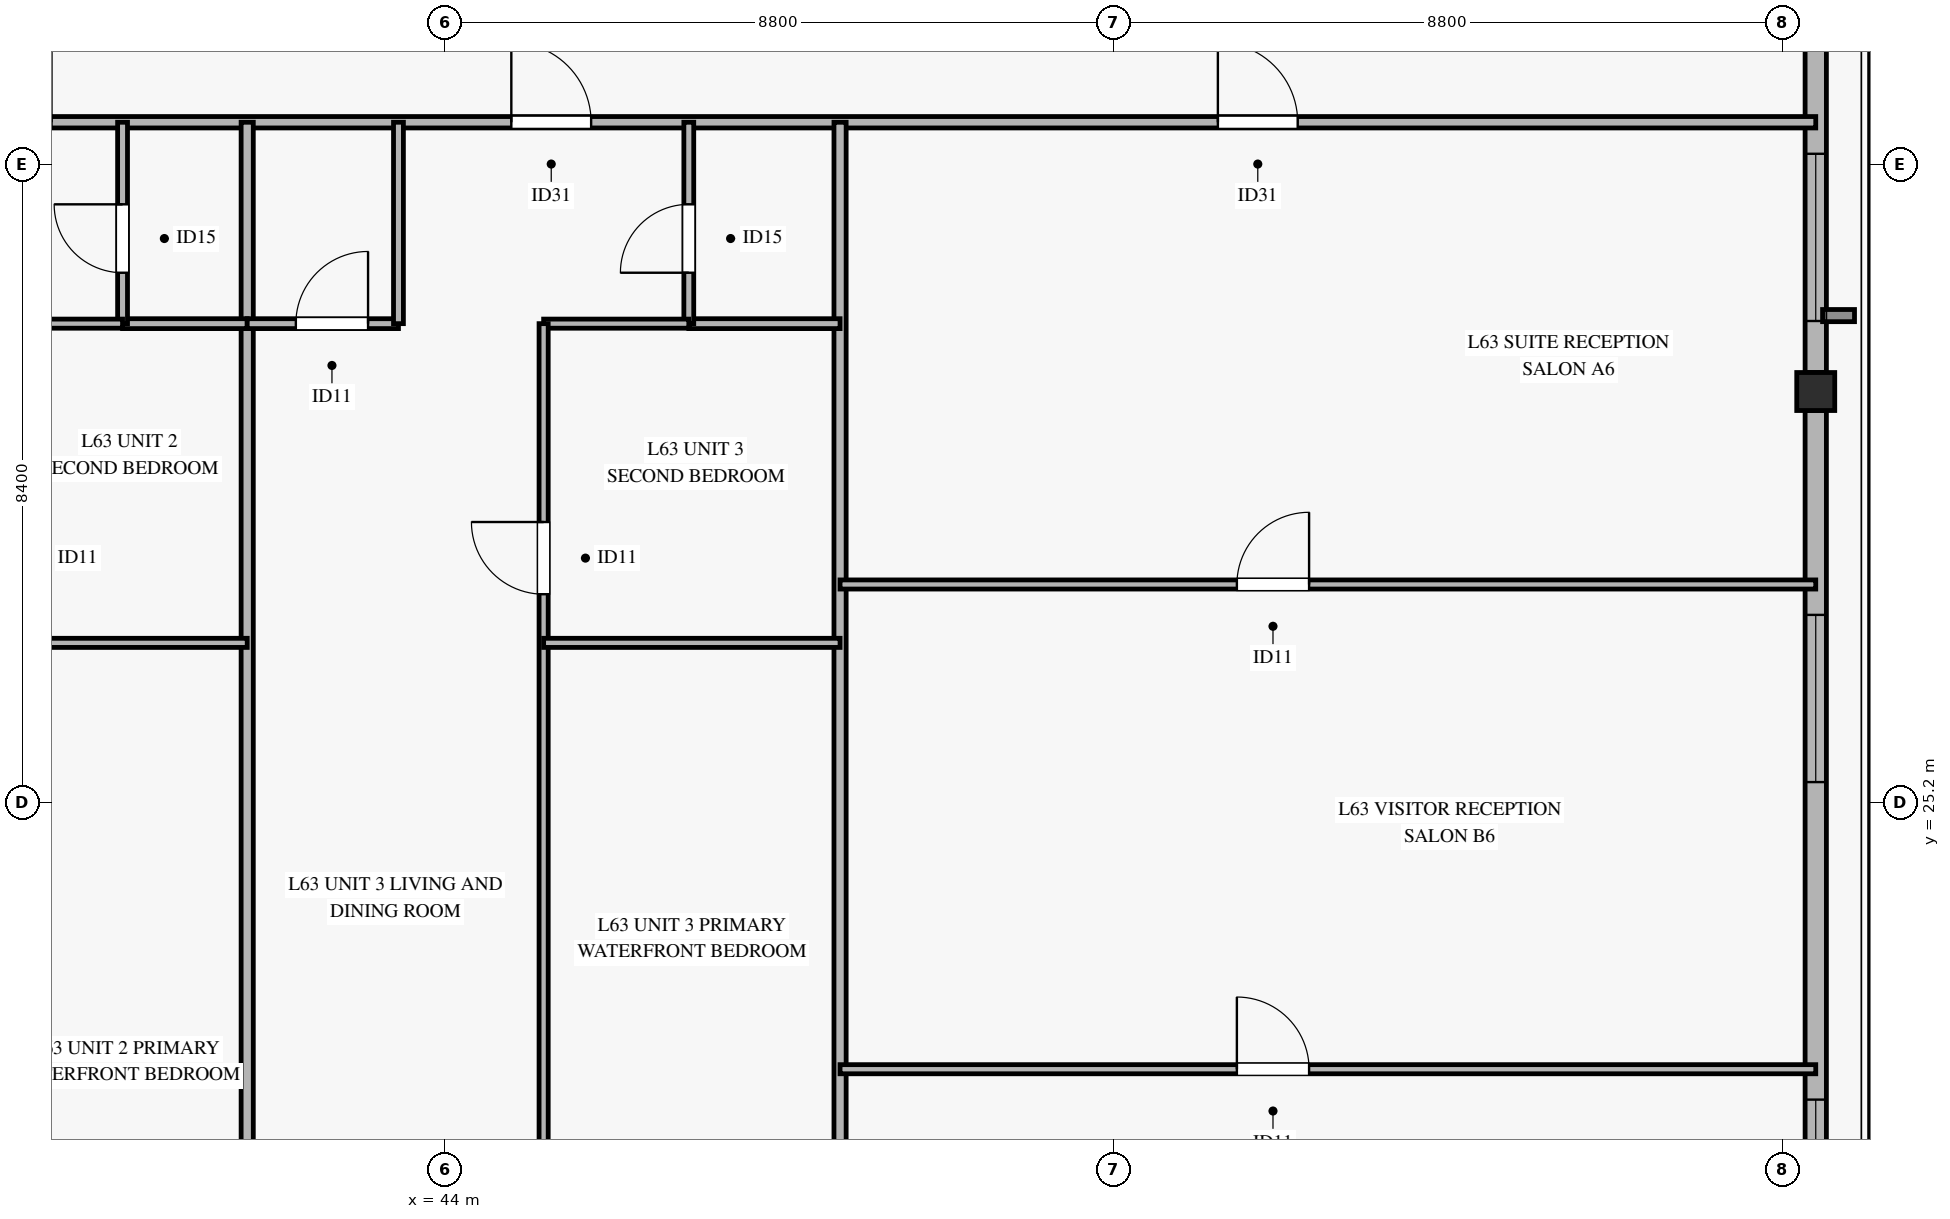
"""IFC4 building model, lengths in metres.
Left out: names, types, materials, properties, quantities, classifications, styles, units other than length and angle.
Written with IfcOpenShell. Run it as: python <this file> out.ifc"""

import sys

from ifc_helpers import new_model, si_unit, direction, frame, frame_2d, origin, origin_2d, place, context, subcontext, project, spatial, rectangle, hollow_rectangle, extrude, source, transform, mapped, element, fill, save


model = new_model("IFC4")
c1 = context("Model", 3, precision=1e-05, world=origin(), true_north=direction((0.0, 1.0)))
c2 = subcontext(c1, "Body", "Model", "MODEL_VIEW")
j1 = project(units=[si_unit("LENGTHUNIT", "METRE"), si_unit("PLANEANGLEUNIT", "RADIAN")], contexts=[c1])
p1 = place(None, origin())
s1 = spatial("IfcSite", under=j1, at=p1, CompositionType="ELEMENT")
p2 = place(p1, origin())
s2 = spatial("IfcBuilding", under=s1, at=p2, CompositionType="ELEMENT")
p3 = place(p2, frame((0.0, 0.0, 248.5)))
s3 = spatial("IfcBuildingStorey", under=s2, at=p3, CompositionType="ELEMENT", Elevation=248.5)
m1 = source(origin(), c2, "Body", "SweptSolid", [
    extrude(hollow_rectangle(XDim=0.5, YDim=0.5, WallThickness=0.024, at=origin_2d()), origin(), (0.0, 0.0, 1.0), 3.185),
])
p4 = place(p3, frame((62.037, 30.607, 0.0), z_axis=(0.0, 0.0, 1.0), x_axis=(1.0, 0.0, 0.0)))
e1 = element("IfcColumn", 1, at=p4, inside=s3, PredefinedType="COLUMN", context=c2, shape_type="MappedRepresentation", body=[
    mapped(m1, transform((0.0, 0.0, 0.0), x_axis=(1.0, 0.0, 0.0), y_axis=(0.0, 1.0, 0.0), z_axis=(0.0, 0.0, 1.0), scale=1.0)),
])
p5 = place(p3, frame((62.037, 17.728, 0.0), z_axis=(0.0, 0.0, 1.0), x_axis=(0.0, 1.0, 0.0)))
e2 = element("IfcWall", 2, at=p5, inside=s3, PredefinedType="SOLIDWALL", context=c2, shape_type="SweptSolid", body=[
    extrude(rectangle(XDim=12.629, YDim=0.28, at=frame_2d((6.314, 0.0))), origin(), (0.0, 0.0, 1.0), 2.815),
])
p6 = place(p5, frame((1.362, 0.0, 0.45)))
e3 = element("IfcOpeningElement", 3, at=p6, cuts=e2, PredefinedType="OPENING", context=c2, shape_type="SweptSolid", body=[
    extrude(rectangle(XDim=2.2, YDim=2.1, at=frame_2d((1.1, 1.05))), frame((0.0, 0.15, 0.0), z_axis=(0.0, -1.0, 0.0), x_axis=(1.0, 0.0, 0.0)), (0.0, 0.0, 1.0), 0.3),
])
p7 = place(p5, frame((7.74, 0.0, 0.45)))
e4 = element("IfcOpeningElement", 4, at=p7, cuts=e2, PredefinedType="OPENING", context=c2, shape_type="SweptSolid", body=[
    extrude(rectangle(XDim=2.2, YDim=2.1, at=frame_2d((1.1, 1.05))), frame((0.0, 0.15, 0.0), z_axis=(0.0, -1.0, 0.0), x_axis=(1.0, 0.0, 0.0)), (0.0, 0.0, 1.0), 0.3),
])
p8 = place(p3, frame((62.037, 30.857, 0.0), z_axis=(0.0, 0.0, 1.0), x_axis=(0.0, 1.0, 0.0)))
e5 = element("IfcWall", 5, at=p8, inside=s3, PredefinedType="SOLIDWALL", context=c2, shape_type="SweptSolid", body=[
    extrude(rectangle(XDim=12.628, YDim=0.28, at=frame_2d((6.314, 0.0))), origin(), (0.0, 0.0, 1.0), 2.815),
])
p9 = place(p8, frame((0.678, 0.0, 0.45)))
e6 = element("IfcOpeningElement", 6, at=p9, cuts=e5, PredefinedType="OPENING", context=c2, shape_type="SweptSolid", body=[
    extrude(rectangle(XDim=2.2, YDim=2.1, at=frame_2d((1.1, 1.05))), frame((0.0, 0.15, 0.0), z_axis=(0.0, -1.0, 0.0), x_axis=(1.0, 0.0, 0.0)), (0.0, 0.0, 1.0), 0.3),
])
p10 = place(p3, frame((8.364, 34.15, 0.0), z_axis=(0.0, 0.0, 1.0), x_axis=(1.0, 0.0, 0.0)))
e7 = element("IfcWall", 7, at=p10, inside=s3, PredefinedType="PARTITIONING", context=c2, shape_type="SweptSolid", body=[
    extrude(rectangle(XDim=53.673, YDim=0.15, at=frame_2d((26.836, 0.0))), origin(), (0.0, 0.0, 1.0), 2.47),
])
p11 = place(p10, frame((5.627, 0.0, 0.0)))
e8 = element("IfcOpeningElement", 8, at=p11, cuts=e7, PredefinedType="OPENING", context=c2, shape_type="SweptSolid", body=[
    extrude(rectangle(XDim=1.05, YDim=2.15, at=frame_2d((0.525, 1.075))), frame((0.0, 0.085, 0.0), z_axis=(0.0, -1.0, 0.0), x_axis=(1.0, 0.0, 0.0)), (0.0, 0.0, 1.0), 0.17),
])
p12 = place(p10, frame((16.561, 0.0, 0.0)))
e9 = element("IfcOpeningElement", 9, at=p12, cuts=e7, PredefinedType="OPENING", context=c2, shape_type="SweptSolid", body=[
    extrude(rectangle(XDim=1.05, YDim=2.15, at=frame_2d((0.525, 1.075))), frame((0.0, 0.085, 0.0), z_axis=(0.0, -1.0, 0.0), x_axis=(1.0, 0.0, 0.0)), (0.0, 0.0, 1.0), 0.17),
])
p13 = place(p10, frame((23.011, 0.0, 0.0)))
e10 = element("IfcOpeningElement", 10, at=p13, cuts=e7, PredefinedType="OPENING", context=c2, shape_type="SweptSolid", body=[
    extrude(rectangle(XDim=1.05, YDim=2.15, at=frame_2d((0.525, 1.075))), frame((0.0, 0.085, 0.0), z_axis=(0.0, -1.0, 0.0), x_axis=(1.0, 0.0, 0.0)), (0.0, 0.0, 1.0), 0.17),
])
p14 = place(p10, frame((29.411, 0.0, 0.0)))
e11 = element("IfcOpeningElement", 11, at=p14, cuts=e7, PredefinedType="OPENING", context=c2, shape_type="SweptSolid", body=[
    extrude(rectangle(XDim=1.05, YDim=2.15, at=frame_2d((0.525, 1.075))), frame((0.0, 0.085, 0.0), z_axis=(0.0, -1.0, 0.0), x_axis=(1.0, 0.0, 0.0)), (0.0, 0.0, 1.0), 0.17),
])
p15 = place(p10, frame((36.511, 0.0, 0.0)))
e12 = element("IfcOpeningElement", 12, at=p15, cuts=e7, PredefinedType="OPENING", context=c2, shape_type="SweptSolid", body=[
    extrude(rectangle(XDim=1.05, YDim=2.15, at=frame_2d((0.525, 1.075))), frame((0.0, 0.085, 0.0), z_axis=(0.0, -1.0, 0.0), x_axis=(1.0, 0.0, 0.0)), (0.0, 0.0, 1.0), 0.17),
])
p16 = place(p10, frame((45.807, 0.0, 0.0)))
e13 = element("IfcOpeningElement", 13, at=p16, cuts=e7, PredefinedType="OPENING", context=c2, shape_type="SweptSolid", body=[
    extrude(rectangle(XDim=1.05, YDim=2.15, at=frame_2d((0.525, 1.075))), frame((0.0, 0.085, 0.0), z_axis=(0.0, -1.0, 0.0), x_axis=(1.0, 0.0, 0.0)), (0.0, 0.0, 1.0), 0.17),
])
for number, where, z_axis, x_axis in (
    (14, (41.4, 15.113, 0.0), (0.0, 0.0, 1.0), (0.0, 1.0, 0.0)),
    (15, (49.2, 15.113, 0.0), (0.0, 0.0, 1.0), (0.0, 1.0, 0.0)),
):
    element("IfcWall", number, at=place(p3, frame(where, z_axis=z_axis, x_axis=x_axis)), inside=s3, PredefinedType="PARTITIONING", context=c2, shape_type="SweptSolid", body=[
        extrude(rectangle(XDim=19.037, YDim=0.16, at=frame_2d((9.519, 0.0))), origin(), (0.0, 0.0, 1.0), 2.77),
    ])
p17 = place(p3, frame((39.76, 31.5, 0.0), z_axis=(0.0, 0.0, 1.0), x_axis=(1.0, 0.0, 0.0)))
e16 = element("IfcWall", 16, at=p17, inside=s3, PredefinedType="PARTITIONING", context=c2, shape_type="SweptSolid", body=[
    extrude(rectangle(XDim=1.64, YDim=0.13, at=frame_2d((0.82, 0.0))), origin(), (0.0, 0.0, 1.0), 3.185),
])
p18 = place(p3, frame((39.76, 31.5, 0.0), z_axis=(0.0, 0.0, 1.0), x_axis=(0.0, 1.0, 0.0)))
e17 = element("IfcWall", 17, at=p18, inside=s3, PredefinedType="PARTITIONING", context=c2, shape_type="SweptSolid", body=[
    extrude(rectangle(XDim=2.65, YDim=0.13, at=frame_2d((1.325, 0.0))), origin(), (0.0, 0.0, 1.0), 2.77),
])
p19 = place(p18, frame((0.67, 0.0, 0.0)))
e18 = element("IfcOpeningElement", 18, at=p19, cuts=e17, PredefinedType="OPENING", context=c2, shape_type="SweptSolid", body=[
    extrude(rectangle(XDim=0.9, YDim=2.1, at=frame_2d((0.45, 1.05))), frame((0.0, 0.075, 0.0), z_axis=(0.0, -1.0, 0.0), x_axis=(1.0, 0.0, 0.0)), (0.0, 0.0, 1.0), 0.15),
])
p20 = place(p3, frame((38.2, 31.5, 0.0), z_axis=(0.0, 0.0, 1.0), x_axis=(1.0, 0.0, 0.0)))
e19 = element("IfcWall", 19, at=p20, inside=s3, PredefinedType="PARTITIONING", context=c2, shape_type="SweptSolid", body=[
    extrude(rectangle(XDim=1.56, YDim=0.12, at=frame_2d((0.78, 0.0))), origin(), (0.0, 0.0, 1.0), 3.185),
])
p21 = place(p3, frame((38.2, 27.3, 0.0), z_axis=(0.0, 0.0, 1.0), x_axis=(1.0, 0.0, 0.0)))
e20 = element("IfcWall", 20, at=p21, inside=s3, PredefinedType="PARTITIONING", context=c2, shape_type="SweptSolid", body=[
    extrude(rectangle(XDim=3.2, YDim=0.12, at=frame_2d((1.6, 0.0))), origin(), (0.0, 0.0, 1.0), 3.185),
])
p22 = place(p3, frame((41.4, 31.5, 0.0), z_axis=(0.0, 0.0, 1.0), x_axis=(1.0, 0.0, 0.0)))
e21 = element("IfcWall", 21, at=p22, inside=s3, PredefinedType="PARTITIONING", context=c2, shape_type="SweptSolid", body=[
    extrude(rectangle(XDim=1.99, YDim=0.13, at=frame_2d((0.995, 0.0))), origin(), (0.0, 0.0, 1.0), 3.185),
])
p23 = place(p22, frame((0.64, 0.0, 0.0)))
e22 = element("IfcOpeningElement", 22, at=p23, cuts=e21, PredefinedType="OPENING", context=c2, shape_type="SweptSolid", body=[
    extrude(rectangle(XDim=0.95, YDim=2.1, at=frame_2d((0.475, 1.05))), frame((0.0, 0.075, 0.0), z_axis=(0.0, -1.0, 0.0), x_axis=(1.0, 0.0, 0.0)), (0.0, 0.0, 1.0), 0.15),
])
p24 = place(p3, frame((43.39, 31.5, 0.0), z_axis=(0.0, 0.0, 1.0), x_axis=(0.0, 1.0, 0.0)))
e23 = element("IfcWall", 23, at=p24, inside=s3, PredefinedType="PARTITIONING", context=c2, shape_type="SweptSolid", body=[
    extrude(rectangle(XDim=2.65, YDim=0.13, at=frame_2d((1.325, 0.0))), origin(), (0.0, 0.0, 1.0), 2.77),
])
p25 = place(p3, frame((47.21, 31.5, 0.0), z_axis=(0.0, 0.0, 1.0), x_axis=(1.0, 0.0, 0.0)))
e24 = element("IfcWall", 24, at=p25, inside=s3, PredefinedType="PARTITIONING", context=c2, shape_type="SweptSolid", body=[
    extrude(rectangle(XDim=1.99, YDim=0.13, at=frame_2d((0.995, 0.0))), origin(), (0.0, 0.0, 1.0), 3.185),
])
p26 = place(p3, frame((47.21, 31.5, 0.0), z_axis=(0.0, 0.0, 1.0), x_axis=(0.0, 1.0, 0.0)))
e25 = element("IfcWall", 25, at=p26, inside=s3, PredefinedType="PARTITIONING", context=c2, shape_type="SweptSolid", body=[
    extrude(rectangle(XDim=2.65, YDim=0.13, at=frame_2d((1.325, 0.0))), origin(), (0.0, 0.0, 1.0), 2.77),
])
p27 = place(p26, frame((0.67, 0.0, 0.0)))
e26 = element("IfcOpeningElement", 26, at=p27, cuts=e25, PredefinedType="OPENING", context=c2, shape_type="SweptSolid", body=[
    extrude(rectangle(XDim=0.9, YDim=2.1, at=frame_2d((0.45, 1.05))), frame((0.0, 0.075, 0.0), z_axis=(0.0, -1.0, 0.0), x_axis=(1.0, 0.0, 0.0)), (0.0, 0.0, 1.0), 0.15),
])
p28 = place(p3, frame((45.3, 31.5, 0.0), z_axis=(0.0, 0.0, 1.0), x_axis=(1.0, 0.0, 0.0)))
e27 = element("IfcWall", 27, at=p28, inside=s3, PredefinedType="PARTITIONING", context=c2, shape_type="SweptSolid", body=[
    extrude(rectangle(XDim=1.91, YDim=0.12, at=frame_2d((0.955, 0.0))), origin(), (0.0, 0.0, 1.0), 3.185),
])
p29 = place(p3, frame((45.3, 15.113, 0.0), z_axis=(0.0, 0.0, 1.0), x_axis=(0.0, 1.0, 0.0)))
e28 = element("IfcWall", 28, at=p29, inside=s3, PredefinedType="PARTITIONING", context=c2, shape_type="SweptSolid", body=[
    extrude(rectangle(XDim=16.387, YDim=0.12, at=frame_2d((8.193, 0.0))), origin(), (0.0, 0.0, 1.0), 2.77),
])
p30 = place(p29, frame((3.87, 0.0, 0.0)))
e29 = element("IfcOpeningElement", 29, at=p30, cuts=e28, PredefinedType="OPENING", context=c2, shape_type="SweptSolid", body=[
    extrude(rectangle(XDim=0.95, YDim=2.1, at=frame_2d((0.475, 1.05))), frame((0.0, 0.07, 0.0), z_axis=(0.0, -1.0, 0.0), x_axis=(1.0, 0.0, 0.0)), (0.0, 0.0, 1.0), 0.14),
])
p31 = place(p29, frame((12.827, 0.0, 0.0)))
e30 = element("IfcOpeningElement", 30, at=p31, cuts=e28, PredefinedType="OPENING", context=c2, shape_type="SweptSolid", body=[
    extrude(rectangle(XDim=0.95, YDim=2.1, at=frame_2d((0.475, 1.05))), frame((0.0, 0.07, 0.0), z_axis=(0.0, -1.0, 0.0), x_axis=(1.0, 0.0, 0.0)), (0.0, 0.0, 1.0), 0.14),
])
p32 = place(p3, frame((45.3, 27.3, 0.0), z_axis=(0.0, 0.0, 1.0), x_axis=(1.0, 0.0, 0.0)))
e31 = element("IfcWall", 31, at=p32, inside=s3, PredefinedType="PARTITIONING", context=c2, shape_type="SweptSolid", body=[
    extrude(rectangle(XDim=3.9, YDim=0.12, at=frame_2d((1.95, 0.0))), origin(), (0.0, 0.0, 1.0), 3.185),
])
p33 = place(p3, frame((49.2, 21.69, 0.0), z_axis=(0.0, 0.0, 1.0), x_axis=(1.0, 0.0, 0.0)))
e32 = element("IfcWall", 32, at=p33, inside=s3, PredefinedType="PARTITIONING", context=c2, shape_type="SweptSolid", body=[
    extrude(rectangle(XDim=12.837, YDim=0.12, at=frame_2d((6.418, 0.0))), origin(), (0.0, 0.0, 1.0), 2.47),
])
p34 = place(p33, frame((5.221, 0.0, 0.0)))
e33 = element("IfcOpeningElement", 33, at=p34, cuts=e32, PredefinedType="OPENING", context=c2, shape_type="SweptSolid", body=[
    extrude(rectangle(XDim=0.95, YDim=2.1, at=frame_2d((0.475, 1.05))), frame((0.0, 0.07, 0.0), z_axis=(0.0, -1.0, 0.0), x_axis=(1.0, 0.0, 0.0)), (0.0, 0.0, 1.0), 0.14),
])
p35 = place(p3, frame((49.2, 28.068, 0.0), z_axis=(0.0, 0.0, 1.0), x_axis=(1.0, 0.0, 0.0)))
e34 = element("IfcWall", 34, at=p35, inside=s3, PredefinedType="PARTITIONING", context=c2, shape_type="SweptSolid", body=[
    extrude(rectangle(XDim=12.837, YDim=0.12, at=frame_2d((6.418, 0.0))), origin(), (0.0, 0.0, 1.0), 2.47),
])
p36 = place(p35, frame((5.221, 0.0, 0.0)))
e35 = element("IfcOpeningElement", 35, at=p36, cuts=e34, PredefinedType="OPENING", context=c2, shape_type="SweptSolid", body=[
    extrude(rectangle(XDim=0.95, YDim=2.1, at=frame_2d((0.475, 1.05))), frame((0.0, 0.07, 0.0), z_axis=(0.0, -1.0, 0.0), x_axis=(1.0, 0.0, 0.0)), (0.0, 0.0, 1.0), 0.14),
])
m2 = source(origin(), c2, "Body", "SweptSolid", [
    extrude(rectangle(XDim=2.2, YDim=2.1, at=frame_2d((1.1, 1.05))), frame((0.0, 0.03, 0.0), z_axis=(0.0, -1.0, 0.0), x_axis=(1.0, 0.0, 0.0)), (0.0, 0.0, 1.0), 0.06),
])
p37 = place(p6, origin())
e36 = element("IfcWindow", 36, at=p37, inside=s3, PartitioningType="SINGLE_PANEL", PredefinedType="WINDOW", context=c2, shape_type="MappedRepresentation", body=[
    mapped(m2, transform((0.0, 0.0, 0.0), x_axis=(1.0, 0.0, 0.0), y_axis=(0.0, 1.0, 0.0), z_axis=(0.0, 0.0, 1.0), scale=1.0)),
])
fill(e3, e36)
p38 = place(p7, origin())
e37 = element("IfcWindow", 37, at=p38, inside=s3, PartitioningType="SINGLE_PANEL", PredefinedType="WINDOW", context=c2, shape_type="MappedRepresentation", body=[
    mapped(m2, transform((0.0, 0.0, 0.0), x_axis=(1.0, 0.0, 0.0), y_axis=(0.0, 1.0, 0.0), z_axis=(0.0, 0.0, 1.0), scale=1.0)),
])
fill(e4, e37)
p39 = place(p9, origin())
e38 = element("IfcWindow", 38, at=p39, inside=s3, PartitioningType="SINGLE_PANEL", PredefinedType="WINDOW", context=c2, shape_type="MappedRepresentation", body=[
    mapped(m2, transform((0.0, 0.0, 0.0), x_axis=(1.0, 0.0, 0.0), y_axis=(0.0, 1.0, 0.0), z_axis=(0.0, 0.0, 1.0), scale=1.0)),
])
fill(e6, e38)
m3 = source(origin(), c2, "Body", "SweptSolid", [
    extrude(rectangle(XDim=0.9, YDim=2.1, at=frame_2d((0.45, 1.05))), frame((0.0, 0.025, 0.0), z_axis=(0.0, -1.0, 0.0), x_axis=(1.0, 0.0, 0.0)), (0.0, 0.0, 1.0), 0.05),
])
p40 = place(p19, origin())
e39 = element("IfcDoor", 39, at=p40, inside=s3, OperationType="SINGLE_SWING_RIGHT", PredefinedType="DOOR", context=c2, shape_type="MappedRepresentation", body=[
    mapped(m3, transform((0.0, 0.0, 0.0), x_axis=(1.0, 0.0, 0.0), y_axis=(0.0, 1.0, 0.0), z_axis=(0.0, 0.0, 1.0), scale=1.0)),
])
fill(e18, e39)
m4 = source(origin(), c2, "Body", "SweptSolid", [
    extrude(rectangle(XDim=1.05, YDim=2.15, at=frame_2d((0.525, 1.075))), frame((0.0, 0.025, 0.0), z_axis=(0.0, -1.0, 0.0), x_axis=(1.0, 0.0, 0.0)), (0.0, 0.0, 1.0), 0.05),
])
p41 = place(p15, origin())
e40 = element("IfcDoor", 40, at=p41, inside=s3, OperationType="SINGLE_SWING_LEFT", PredefinedType="DOOR", context=c2, shape_type="MappedRepresentation", body=[
    mapped(m4, transform((0.0, 0.0, 0.0), x_axis=(1.0, 0.0, 0.0), y_axis=(0.0, 1.0, 0.0), z_axis=(0.0, 0.0, 1.0), scale=1.0)),
])
fill(e12, e40)
m5 = source(origin(), c2, "Body", "SweptSolid", [
    extrude(rectangle(XDim=0.95, YDim=2.1, at=frame_2d((0.475, 1.05))), frame((0.0, 0.025, 0.0), z_axis=(0.0, -1.0, 0.0), x_axis=(1.0, 0.0, 0.0)), (0.0, 0.0, 1.0), 0.05),
])
p42 = place(p23, origin())
e41 = element("IfcDoor", 41, at=p42, inside=s3, OperationType="SINGLE_SWING_RIGHT", PredefinedType="DOOR", context=c2, shape_type="MappedRepresentation", body=[
    mapped(m5, transform((0.0, 0.0, 0.0), x_axis=(1.0, 0.0, 0.0), y_axis=(0.0, 1.0, 0.0), z_axis=(0.0, 0.0, 1.0), scale=1.0)),
])
fill(e22, e41)
p43 = place(p27, origin())
e42 = element("IfcDoor", 42, at=p43, inside=s3, OperationType="SINGLE_SWING_LEFT", PredefinedType="DOOR", context=c2, shape_type="MappedRepresentation", body=[
    mapped(m3, transform((0.0, 0.0, 0.0), x_axis=(1.0, 0.0, 0.0), y_axis=(0.0, 1.0, 0.0), z_axis=(0.0, 0.0, 1.0), scale=1.0)),
])
fill(e26, e42)
p44 = place(p31, origin())
e43 = element("IfcDoor", 43, at=p44, inside=s3, OperationType="SINGLE_SWING_RIGHT", PredefinedType="DOOR", context=c2, shape_type="MappedRepresentation", body=[
    mapped(m5, transform((0.0, 0.0, 0.0), x_axis=(1.0, 0.0, 0.0), y_axis=(0.0, 1.0, 0.0), z_axis=(0.0, 0.0, 1.0), scale=1.0)),
])
fill(e30, e43)
p45 = place(p16, origin())
e44 = element("IfcDoor", 44, at=p45, inside=s3, OperationType="SINGLE_SWING_LEFT", PredefinedType="DOOR", context=c2, shape_type="MappedRepresentation", body=[
    mapped(m4, transform((0.0, 0.0, 0.0), x_axis=(1.0, 0.0, 0.0), y_axis=(0.0, 1.0, 0.0), z_axis=(0.0, 0.0, 1.0), scale=1.0)),
])
fill(e13, e44)
p46 = place(p36, origin())
e45 = element("IfcDoor", 45, at=p46, inside=s3, OperationType="SINGLE_SWING_RIGHT", PredefinedType="DOOR", context=c2, shape_type="MappedRepresentation", body=[
    mapped(m5, transform((0.0, 0.0, 0.0), x_axis=(1.0, 0.0, 0.0), y_axis=(0.0, 1.0, 0.0), z_axis=(0.0, 0.0, 1.0), scale=1.0)),
])
fill(e35, e45)
p47 = place(p34, origin())
e46 = element("IfcDoor", 46, at=p47, inside=s3, OperationType="SINGLE_SWING_LEFT", PredefinedType="DOOR", context=c2, shape_type="MappedRepresentation", body=[
    mapped(m5, transform((0.0, 0.0, 0.0), x_axis=(1.0, 0.0, 0.0), y_axis=(0.0, 1.0, 0.0), z_axis=(0.0, 0.0, 1.0), scale=1.0)),
])
fill(e33, e46)
save(model, sys.argv[1])
